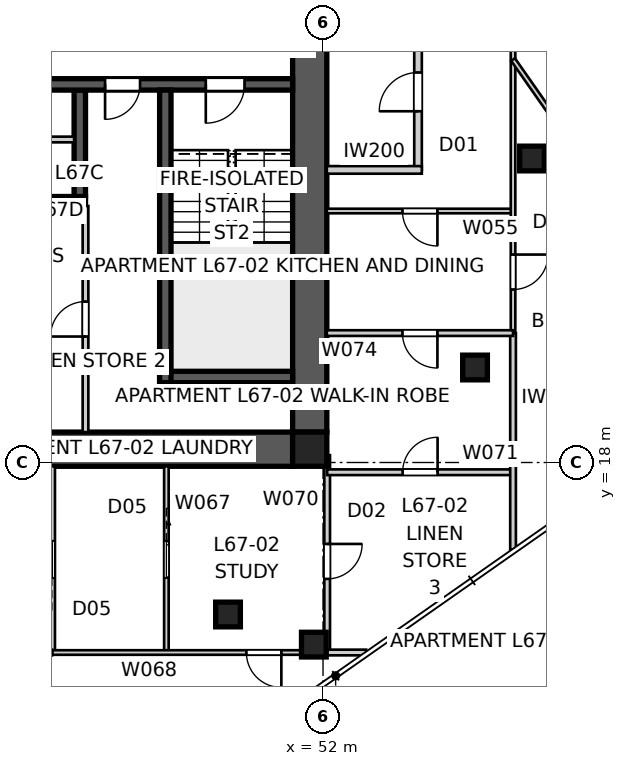
"""IFC4 building model, lengths in metres.
Left out: names, types, materials, properties, quantities, classifications, styles, units other than length and angle.
Written with IfcOpenShell. Run it as: python <this file> out.ifc"""

import sys

from ifc_helpers import new_model, si_unit, direction, frame, frame_2d, origin, origin_2d, place, context, subcontext, project, spatial, polyline, rectangle, outline, extrude, element, fill, save


model = new_model("IFC4")
c1 = context("Model", 3, precision=1e-05, world=origin(), true_north=direction((0.0, 1.0)))
c2 = subcontext(c1, "Body", "Model", "MODEL_VIEW")
j1 = project(units=[si_unit("LENGTHUNIT", "METRE"), si_unit("PLANEANGLEUNIT", "RADIAN")], contexts=[c1])
p1 = place(None, origin())
s1 = spatial("IfcSite", under=j1, at=p1, CompositionType="ELEMENT")
p2 = place(p1, origin())
s2 = spatial("IfcBuilding", under=s1, at=p2, CompositionType="ELEMENT")
p3 = place(p2, frame((0.0, 0.0, 243.8)))
s3 = spatial("IfcBuildingStorey", under=s2, at=p3, CompositionType="ELEMENT", Elevation=243.8)
p4 = place(p3, frame((51.2, 18.35, 0.0), z_axis=(0.0, 0.0, 1.0), x_axis=(-1.0, 0.0, 0.0)))
e1 = element("IfcWall", 1, at=p4, inside=s3, PredefinedType="SHEAR", context=c2, shape_type="SweptSolid", body=[
    extrude(outline(polyline([(0.0, -0.45), (22.4, -0.45), (22.4, -0.025), (22.85, -0.025), (22.85, 0.025), (22.4, 0.025), (22.4, 0.45), (0.0, 0.45), (0.0, 0.025), (-0.45, 0.025), (-0.45, -0.025), (0.0, -0.025), (0.0, -0.45)])), origin(), (0.0, 0.0, 1.0), 3.4),
])
p5 = place(p3, frame((51.65, 18.8, 0.0), z_axis=(0.0, 0.0, 1.0), x_axis=(0.0, 1.0, 0.0)))
e2 = element("IfcWall", 2, at=p5, inside=s3, PredefinedType="SHEAR", context=c2, shape_type="SweptSolid", body=[
    extrude(outline(polyline([(0.0, -0.45), (22.4, -0.45), (22.4, -0.025), (22.85, -0.025), (22.85, 0.025), (22.4, 0.025), (22.4, 0.45), (0.0, 0.45), (0.0, 0.025), (-0.45, 0.025), (-0.45, -0.025), (0.0, -0.025), (0.0, -0.45)])), origin(), (0.0, 0.0, 1.0), 3.4),
])
p6 = place(p5, frame((11.14, 0.0, 0.0)))
e3 = element("IfcOpeningElement", 3, at=p6, cuts=e2, PredefinedType="OPENING", context=c2, shape_type="SweptSolid", body=[
    extrude(rectangle(XDim=1.02, YDim=2.4, at=frame_2d((0.51, 1.2))), frame((0.0, 0.46, 0.0), z_axis=(0.0, -1.0, 0.0), x_axis=(1.0, 0.0, 0.0)), (0.0, 0.0, 1.0), 0.92),
])
p7 = place(p3, frame((51.2, 27.95, 0.0), z_axis=(0.0, 0.0, 1.0), x_axis=(-1.0, 0.0, 0.0)))
e4 = element("IfcWall", 4, at=p7, inside=s3, PredefinedType="SHEAR", context=c2, shape_type="SweptSolid", body=[
    extrude(rectangle(XDim=22.4, YDim=0.3, at=frame_2d((11.2, 0.0))), origin(), (0.0, 0.0, 1.0), 3.4),
])
p8 = place(p7, frame((19.04, 0.0, 0.0)))
e5 = element("IfcOpeningElement", 5, at=p8, cuts=e4, PredefinedType="OPENING", context=c2, shape_type="SweptSolid", body=[
    extrude(rectangle(XDim=0.92, YDim=2.1, at=frame_2d((0.46, 1.05))), frame((0.0, 0.16, 0.0), z_axis=(0.0, -1.0, 0.0), x_axis=(1.0, 0.0, 0.0)), (0.0, 0.0, 1.0), 0.32),
])
p9 = place(p7, frame((1.265, 0.0, 0.0)))
e6 = element("IfcOpeningElement", 6, at=p9, cuts=e4, PredefinedType="OPENING", context=c2, shape_type="SweptSolid", body=[
    extrude(rectangle(XDim=1.02, YDim=2.1, at=frame_2d((0.51, 1.05))), frame((0.0, 0.16, 0.0), z_axis=(0.0, -1.0, 0.0), x_axis=(1.0, 0.0, 0.0)), (0.0, 0.0, 1.0), 0.32),
])
p10 = place(p7, frame((4.015, 0.0, 0.0)))
e7 = element("IfcOpeningElement", 7, at=p10, cuts=e4, PredefinedType="OPENING", context=c2, shape_type="SweptSolid", body=[
    extrude(rectangle(XDim=0.92, YDim=2.1, at=frame_2d((0.46, 1.05))), frame((0.0, 0.16, 0.0), z_axis=(0.0, -1.0, 0.0), x_axis=(1.0, 0.0, 0.0)), (0.0, 0.0, 1.0), 0.32),
])
p11 = place(p7, frame((9.34, 0.0, 0.0)))
e8 = element("IfcOpeningElement", 8, at=p11, cuts=e4, PredefinedType="OPENING", context=c2, shape_type="SweptSolid", body=[
    extrude(rectangle(XDim=0.92, YDim=2.1, at=frame_2d((0.46, 1.05))), frame((0.0, 0.16, 0.0), z_axis=(0.0, -1.0, 0.0), x_axis=(1.0, 0.0, 0.0)), (0.0, 0.0, 1.0), 0.32),
])
p12 = place(p7, frame((7.015, 0.0, 0.0)))
e9 = element("IfcOpeningElement", 9, at=p12, cuts=e4, PredefinedType="OPENING", context=c2, shape_type="SweptSolid", body=[
    extrude(rectangle(XDim=0.92, YDim=2.1, at=frame_2d((0.46, 1.05))), frame((0.0, 0.16, 0.0), z_axis=(0.0, -1.0, 0.0), x_axis=(1.0, 0.0, 0.0)), (0.0, 0.0, 1.0), 0.32),
])
p13 = place(p7, frame((12.05, 0.0, 0.0)))
e10 = element("IfcOpeningElement", 10, at=p13, cuts=e4, PredefinedType="OPENING", context=c2, shape_type="SweptSolid", body=[
    extrude(rectangle(XDim=1.1, YDim=2.1, at=frame_2d((0.55, 1.05))), frame((0.0, 0.16, 0.0), z_axis=(0.0, -1.0, 0.0), x_axis=(1.0, 0.0, 0.0)), (0.0, 0.0, 1.0), 0.32),
])
p14 = place(p7, frame((14.85, 0.0, 0.0)))
e11 = element("IfcOpeningElement", 11, at=p14, cuts=e4, PredefinedType="OPENING", context=c2, shape_type="SweptSolid", body=[
    extrude(rectangle(XDim=1.1, YDim=2.1, at=frame_2d((0.55, 1.05))), frame((0.0, 0.16, 0.0), z_axis=(0.0, -1.0, 0.0), x_axis=(1.0, 0.0, 0.0)), (0.0, 0.0, 1.0), 0.32),
])
p15 = place(p3, frame((45.75, 24.85, 0.0), z_axis=(0.0, 0.0, 1.0), x_axis=(-1.0, 0.0, 0.0)))
e12 = element("IfcWall", 12, at=p15, inside=s3, PredefinedType="SHEAR", context=c2, shape_type="SweptSolid", body=[
    extrude(rectangle(XDim=11.5, YDim=0.3, at=frame_2d((5.75, 0.0))), origin(), (0.0, 0.0, 1.0), 3.4),
])
p16 = place(p3, frame((45.6, 27.8, 0.0), z_axis=(0.0, 0.0, 1.0), x_axis=(0.0, -1.0, 0.0)))
e13 = element("IfcWall", 13, at=p16, inside=s3, PredefinedType="SHEAR", context=c2, shape_type="SweptSolid", body=[
    extrude(rectangle(XDim=2.8, YDim=0.3, at=frame_2d((1.4, 0.0))), origin(), (0.0, 0.0, 1.0), 3.4),
])
p17 = place(p3, frame((47.85, 27.8, 0.0), z_axis=(0.0, 0.0, 1.0), x_axis=(0.0, -1.0, 0.0)))
e14 = element("IfcWall", 14, at=p17, inside=s3, PredefinedType="SHEAR", context=c2, shape_type="SweptSolid", body=[
    extrude(rectangle(XDim=7.7, YDim=0.3, at=frame_2d((3.85, 0.0))), origin(), (0.0, 0.0, 1.0), 3.4),
])
p18 = place(p3, frame((51.2, 20.25, 0.0), z_axis=(0.0, 0.0, 1.0), x_axis=(-1.0, 0.0, 0.0)))
e15 = element("IfcWall", 15, at=p18, inside=s3, PredefinedType="SHEAR", context=c2, shape_type="SweptSolid", body=[
    extrude(rectangle(XDim=3.5, YDim=0.3, at=frame_2d((1.75, 0.0))), origin(), (0.0, 0.0, 1.0), 3.4),
])
p19 = place(p3, frame((51.65, 18.35, 0.0), z_axis=(0.0, 0.0, 1.0), x_axis=(1.0, 0.0, 0.0)))
e16 = element("IfcColumn", 16, at=p19, inside=s3, PredefinedType="COLUMN", context=c2, shape_type="SweptSolid", body=[
    extrude(rectangle(XDim=0.9, YDim=0.9, at=origin_2d()), origin(), (0.0, 0.0, 1.0), 3.4),
])
for number, where, z_axis, x_axis in (
    (17, (51.758, 13.207, 0.0), (0.0, 0.0, 1.0), (1.0, 0.0, 0.0)),
    (18, (57.5, 26.0, 0.0), (0.0, 0.0, 1.0), (1.0, 0.0, 0.0)),
    (19, (49.5, 14.0, 0.0), (0.0, 0.0, 1.0), (1.0, 0.0, 0.0)),
    (20, (56.0, 20.5, 0.0), (0.0, 0.0, 1.0), (1.0, 0.0, 0.0)),
):
    element("IfcColumn", number, at=place(p3, frame(where, z_axis=z_axis, x_axis=x_axis)), inside=s3, PredefinedType="COLUMN", context=c2, shape_type="SweptSolid", body=[
        extrude(rectangle(XDim=0.65, YDim=0.65, at=origin_2d()), origin(), (0.0, 0.0, 1.0), 3.4),
    ])
p20 = place(p3, frame((54.5, 25.7, 0.0), z_axis=(0.0, 0.0, 1.0), x_axis=(0.0, 1.0, 0.0)))
e21 = element("IfcWall", 21, at=p20, inside=s3, PredefinedType="PARTITIONING", context=c2, shape_type="SweptSolid", body=[
    extrude(rectangle(XDim=8.6, YDim=0.2, at=frame_2d((4.3, 0.0))), origin(), (0.0, 0.0, 1.0), 3.25),
])
p21 = place(p20, frame((5.438, 0.0, 0.0)))
e22 = element("IfcOpeningElement", 22, at=p21, cuts=e21, PredefinedType="OPENING", context=c2, shape_type="SweptSolid", body=[
    extrude(rectangle(XDim=1.02, YDim=2.34, at=frame_2d((0.51, 1.17))), frame((0.0, 0.11, 0.0), z_axis=(0.0, -1.0, 0.0), x_axis=(1.0, 0.0, 0.0)), (0.0, 0.0, 1.0), 0.22),
])
p22 = place(p20, frame((1.543, 0.0, 0.0)))
e23 = element("IfcOpeningElement", 23, at=p22, cuts=e21, PredefinedType="OPENING", context=c2, shape_type="SweptSolid", body=[
    extrude(rectangle(XDim=1.02, YDim=2.34, at=frame_2d((0.51, 1.17))), frame((0.0, 0.11, 0.0), z_axis=(0.0, -1.0, 0.0), x_axis=(1.0, 0.0, 0.0)), (0.0, 0.0, 1.0), 0.22),
])
p23 = place(p3, frame((52.1, 25.7, 0.0), z_axis=(0.0, 0.0, 1.0), x_axis=(1.0, 0.0, 0.0)))
e24 = element("IfcWall", 24, at=p23, inside=s3, PredefinedType="PARTITIONING", context=c2, shape_type="SweptSolid", body=[
    extrude(rectangle(XDim=2.5, YDim=0.2, at=frame_2d((1.25, 0.0))), origin(), (0.0, 0.0, 1.0), 3.25),
])
p24 = place(p3, frame((45.75, 18.8, 0.0), z_axis=(0.0, 0.0, 1.0), x_axis=(0.0, 1.0, 0.0)))
e25 = element("IfcWall", 25, at=p24, inside=s3, PredefinedType="SOLIDWALL", context=c2, shape_type="SweptSolid", body=[
    extrude(rectangle(XDim=5.95, YDim=0.15, at=frame_2d((2.975, 0.0))), origin(), (0.0, 0.0, 1.0), 3.25),
])
p25 = place(p24, frame((2.515, 0.0, 0.0)))
e26 = element("IfcOpeningElement", 26, at=p25, cuts=e25, PredefinedType="OPENING", context=c2, shape_type="SweptSolid", body=[
    extrude(rectangle(XDim=0.92, YDim=2.1, at=frame_2d((0.46, 1.05))), frame((0.0, 0.085, 0.0), z_axis=(0.0, -1.0, 0.0), x_axis=(1.0, 0.0, 0.0)), (0.0, 0.0, 1.0), 0.17),
])
p26 = place(p3, frame((57.0, 24.618, 0.0), z_axis=(0.0, 0.0, 1.0), x_axis=(-1.0, 0.0, 0.0)))
e27 = element("IfcWall", 27, at=p26, inside=s3, PredefinedType="PARTITIONING", context=c2, shape_type="SweptSolid", body=[
    extrude(rectangle(XDim=4.9, YDim=0.12, at=frame_2d((2.45, 0.0))), origin(), (0.0, 0.0, 1.0), 3.25),
])
p27 = place(p26, frame((1.99, 0.0, 0.0)))
e28 = element("IfcOpeningElement", 28, at=p27, cuts=e27, PredefinedType="OPENING", context=c2, shape_type="SweptSolid", body=[
    extrude(rectangle(XDim=0.92, YDim=2.34, at=frame_2d((0.46, 1.17))), frame((0.0, 0.07, 0.0), z_axis=(0.0, -1.0, 0.0), x_axis=(1.0, 0.0, 0.0)), (0.0, 0.0, 1.0), 0.14),
])
p28 = place(p3, frame((57.0, 41.904, 0.0), z_axis=(0.0, 0.0, 1.0), x_axis=(0.0, -1.0, 0.0)))
e29 = element("IfcWall", 29, at=p28, inside=s3, PredefinedType="PARTITIONING", context=c2, shape_type="SweptSolid", body=[
    extrude(rectangle(XDim=20.498, YDim=0.12, at=frame_2d((10.249, 0.0))), origin(), (0.0, 0.0, 1.0), 2.55),
])
p29 = place(p28, frame((8.449, 0.0, 0.0)))
e30 = element("IfcOpeningElement", 30, at=p29, cuts=e29, PredefinedType="OPENING", context=c2, shape_type="SweptSolid", body=[
    extrude(rectangle(XDim=0.92, YDim=2.34, at=frame_2d((0.46, 1.17))), frame((0.0, 0.07, 0.0), z_axis=(0.0, -1.0, 0.0), x_axis=(1.0, 0.0, 0.0)), (0.0, 0.0, 1.0), 0.14),
])
p30 = place(p28, frame((11.574, 0.0, 0.0)))
e31 = element("IfcOpeningElement", 31, at=p30, cuts=e29, PredefinedType="OPENING", context=c2, shape_type="SweptSolid", body=[
    extrude(rectangle(XDim=0.92, YDim=2.34, at=frame_2d((0.46, 1.17))), frame((0.0, 0.07, 0.0), z_axis=(0.0, -1.0, 0.0), x_axis=(1.0, 0.0, 0.0)), (0.0, 0.0, 1.0), 0.14),
])
p31 = place(p28, frame((18.432, 0.0, 0.0)))
e32 = element("IfcOpeningElement", 32, at=p31, cuts=e29, PredefinedType="OPENING", context=c2, shape_type="SweptSolid", body=[
    extrude(rectangle(XDim=0.92, YDim=2.34, at=frame_2d((0.46, 1.17))), frame((0.0, 0.07, 0.0), z_axis=(0.0, -1.0, 0.0), x_axis=(1.0, 0.0, 0.0)), (0.0, 0.0, 1.0), 0.14),
])
p32 = place(p3, frame((44.871, 13.0, 0.0), z_axis=(0.0, 0.0, 1.0), x_axis=(0.0, 1.0, 0.0)))
e33 = element("IfcWall", 33, at=p32, inside=s3, PredefinedType="SOLIDWALL", context=c2, shape_type="SweptSolid", body=[
    extrude(rectangle(XDim=4.9, YDim=0.15, at=frame_2d((2.45, 0.0))), origin(), (0.0, 0.0, 1.0), 3.25),
])
p33 = place(p32, frame((1.97, 0.0, 0.0)))
e34 = element("IfcOpeningElement", 34, at=p33, cuts=e33, PredefinedType="OPENING", context=c2, shape_type="SweptSolid", body=[
    extrude(rectangle(XDim=0.96, YDim=2.1, at=frame_2d((0.48, 1.05))), frame((0.0, 0.085, 0.0), z_axis=(0.0, -1.0, 0.0), x_axis=(1.0, 0.0, 0.0)), (0.0, 0.0, 1.0), 0.17),
])
p34 = place(p3, frame((47.878, 17.9, 0.0), z_axis=(0.0, 0.0, 1.0), x_axis=(0.0, -1.0, 0.0)))
e35 = element("IfcWall", 35, at=p34, inside=s3, PredefinedType="PARTITIONING", context=c2, shape_type="SweptSolid", body=[
    extrude(rectangle(XDim=4.9, YDim=0.12, at=frame_2d((2.45, 0.0))), origin(), (0.0, 0.0, 1.0), 3.25),
])
p35 = place(p34, frame((1.97, 0.0, 0.0)))
e36 = element("IfcOpeningElement", 36, at=p35, cuts=e35, PredefinedType="OPENING", context=c2, shape_type="SweptSolid", body=[
    extrude(rectangle(XDim=0.96, YDim=2.1, at=frame_2d((0.48, 1.05))), frame((0.0, 0.07, 0.0), z_axis=(0.0, -1.0, 0.0), x_axis=(1.0, 0.0, 0.0)), (0.0, 0.0, 1.0), 0.14),
])
p36 = place(p3, frame((52.109, 13.0, 0.0), z_axis=(0.0, 0.0, 1.0), x_axis=(-1.0, 0.0, 0.0)))
e37 = element("IfcWall", 37, at=p36, inside=s3, PredefinedType="PARTITIONING", context=c2, shape_type="SweptSolid", body=[
    extrude(rectangle(XDim=7.238, YDim=0.12, at=frame_2d((3.619, 0.0))), origin(), (0.0, 0.0, 1.0), 2.55),
])
p37 = place(p36, frame((1.205, 0.0, 0.0)))
e38 = element("IfcOpeningElement", 38, at=p37, cuts=e37, PredefinedType="OPENING", context=c2, shape_type="SweptSolid", body=[
    extrude(rectangle(XDim=0.92, YDim=2.34, at=frame_2d((0.46, 1.17))), frame((0.0, 0.07, 0.0), z_axis=(0.0, -1.0, 0.0), x_axis=(1.0, 0.0, 0.0)), (0.0, 0.0, 1.0), 0.14),
])
p38 = place(p3, frame((44.871, 13.0, 0.0), z_axis=(0.0, 0.0, 1.0), x_axis=(-1.0, 0.0, 0.0)))
e39 = element("IfcWall", 39, at=p38, inside=s3, PredefinedType="SOLIDWALL", context=c2, shape_type="SweptSolid", body=[
    extrude(rectangle(XDim=3.007, YDim=0.15, at=frame_2d((1.503, 0.0))), origin(), (0.0, 0.0, 1.0), 3.25),
])
p39 = place(p3, frame((52.109, 18.194, 0.0), z_axis=(0.0, 0.0, 1.0), x_axis=(0.0, -1.0, 0.0)))
e40 = element("IfcWall", 40, at=p39, inside=s3, PredefinedType="SOLIDWALL", context=c2, shape_type="SweptSolid", body=[
    extrude(rectangle(XDim=5.194, YDim=0.15, at=frame_2d((2.597, 0.0))), origin(), (0.0, 0.0, 1.0), 3.25),
])
p40 = place(p39, frame((2.337, 0.0, 0.0)))
e41 = element("IfcOpeningElement", 41, at=p40, cuts=e40, PredefinedType="OPENING", context=c2, shape_type="SweptSolid", body=[
    extrude(rectangle(XDim=0.92, YDim=2.34, at=frame_2d((0.46, 1.17))), frame((0.0, 0.085, 0.0), z_axis=(0.0, -1.0, 0.0), x_axis=(1.0, 0.0, 0.0)), (0.0, 0.0, 1.0), 0.17),
])
p41 = place(p3, frame((52.109, 17.743, 0.0), z_axis=(0.0, 0.0, 1.0), x_axis=(1.0, 0.0, 0.0)))
e42 = element("IfcWall", 42, at=p41, inside=s3, PredefinedType="SOLIDWALL", context=c2, shape_type="SweptSolid", body=[
    extrude(rectangle(XDim=4.891, YDim=0.15, at=frame_2d((2.446, 0.0))), origin(), (0.0, 0.0, 1.0), 3.25),
])
p42 = place(p41, frame((1.986, 0.0, 0.0)))
e43 = element("IfcOpeningElement", 43, at=p42, cuts=e42, PredefinedType="OPENING", context=c2, shape_type="SweptSolid", body=[
    extrude(rectangle(XDim=0.92, YDim=2.34, at=frame_2d((0.46, 1.17))), frame((0.0, 0.085, 0.0), z_axis=(0.0, -1.0, 0.0), x_axis=(1.0, 0.0, 0.0)), (0.0, 0.0, 1.0), 0.17),
])
p43 = place(p3, frame((57.0, 21.406, 0.0), z_axis=(0.0, 0.0, 1.0), x_axis=(0.0, -1.0, 0.0)))
e44 = element("IfcWall", 44, at=p43, inside=s3, PredefinedType="SOLIDWALL", context=c2, shape_type="SweptSolid", body=[
    extrude(rectangle(XDim=5.7, YDim=0.15, at=frame_2d((2.85, 0.0))), origin(), (0.0, 0.0, 1.0), 3.25),
])
p44 = place(p3, frame((53.136, 13.0, 0.0), z_axis=(0.0, 0.0, 1.0), x_axis=(-1.0, 0.0, 0.0)))
e45 = element("IfcWall", 45, at=p44, inside=s3, PredefinedType="SOLIDWALL", context=c2, shape_type="SweptSolid", body=[
    extrude(rectangle(XDim=1.027, YDim=0.15, at=frame_2d((0.513, 0.0))), origin(), (0.0, 0.0, 1.0), 3.25),
])
p45 = place(p3, frame((57.0, 21.406, 0.0), z_axis=(0.0, 0.0, 1.0), x_axis=(-1.0, 0.0, 0.0)))
e46 = element("IfcWall", 46, at=p45, inside=s3, PredefinedType="SOLIDWALL", context=c2, shape_type="SweptSolid", body=[
    extrude(rectangle(XDim=4.9, YDim=0.15, at=frame_2d((2.45, 0.0))), origin(), (0.0, 0.0, 1.0), 3.25),
])
p46 = place(p45, frame((1.99, 0.0, 0.0)))
e47 = element("IfcOpeningElement", 47, at=p46, cuts=e46, PredefinedType="OPENING", context=c2, shape_type="SweptSolid", body=[
    extrude(rectangle(XDim=0.92, YDim=2.34, at=frame_2d((0.46, 1.17))), frame((0.0, 0.085, 0.0), z_axis=(0.0, -1.0, 0.0), x_axis=(1.0, 0.0, 0.0)), (0.0, 0.0, 1.0), 0.17),
])
p47 = place(p3, frame((41.222, 13.0, 0.0), z_axis=(0.0, 0.0, 1.0), x_axis=(0.57357503053, -0.819153028653, 0.0)))
e48 = element("IfcWall", 48, at=p47, inside=s3, PredefinedType="PARTITIONING", context=c2, shape_type="SweptSolid", body=[
    extrude(rectangle(XDim=6.834, YDim=0.12, at=frame_2d((3.417, 0.0))), origin(), (0.0, 0.0, 1.0), 3.25),
])
p48 = place(p47, frame((3.386, 0.0, 0.0)))
e49 = element("IfcOpeningElement", 49, at=p48, cuts=e48, PredefinedType="OPENING", context=c2, shape_type="SweptSolid", body=[
    extrude(rectangle(XDim=0.92, YDim=2.34, at=frame_2d((0.46, 1.17))), frame((0.0, 0.07, 0.0), z_axis=(0.0, -1.0, 0.0), x_axis=(1.0, 0.0, 0.0)), (0.0, 0.0, 1.0), 0.14),
])
p49 = place(p3, frame((57.0, 28.604, 0.0), z_axis=(0.0, 0.0, 1.0), x_axis=(0.573575545802, -0.819152667857, 0.0)))
e50 = element("IfcWall", 50, at=p49, inside=s3, PredefinedType="PARTITIONING", context=c2, shape_type="SweptSolid", body=[
    extrude(rectangle(XDim=10.566, YDim=0.12, at=frame_2d((5.283, 0.0))), origin(), (0.0, 0.0, 1.0), 3.25),
])
p50 = place(p49, frame((8.121, 0.0, 0.0)))
e51 = element("IfcOpeningElement", 51, at=p50, cuts=e50, PredefinedType="OPENING", context=c2, shape_type="SweptSolid", body=[
    extrude(rectangle(XDim=0.92, YDim=2.34, at=frame_2d((0.46, 1.17))), frame((0.0, 0.07, 0.0), z_axis=(0.0, -1.0, 0.0), x_axis=(1.0, 0.0, 0.0)), (0.0, 0.0, 1.0), 0.14),
])
p51 = place(p3, frame((40.1, 26.5, 0.0), z_axis=(0.0, 0.0, 1.0), x_axis=(1.0, 0.0, 0.0)))
e52 = element("IfcWall", 52, at=p51, inside=s3, PredefinedType="SOLIDWALL", context=c2, shape_type="SweptSolid", body=[
    extrude(rectangle(XDim=5.35, YDim=0.15, at=frame_2d((2.675, 0.0))), origin(), (0.0, 0.0, 1.0), 3.25),
])
p52 = place(p51, frame((2.215, 0.0, 0.0)))
e53 = element("IfcOpeningElement", 53, at=p52, cuts=e52, PredefinedType="OPENING", context=c2, shape_type="SweptSolid", body=[
    extrude(rectangle(XDim=0.92, YDim=2.1, at=frame_2d((0.46, 1.05))), frame((0.0, 0.085, 0.0), z_axis=(0.0, -1.0, 0.0), x_axis=(1.0, 0.0, 0.0)), (0.0, 0.0, 1.0), 0.17),
])
p53 = place(p9, origin())
e54 = element("IfcDoor", 54, at=p53, inside=s3, OperationType="SINGLE_SWING_RIGHT", PredefinedType="DOOR", context=c2, shape_type="SweptSolid", body=[
    extrude(rectangle(XDim=1.02, YDim=2.1, at=frame_2d((0.51, 1.05))), frame((0.0, 0.025, 0.0), z_axis=(0.0, -1.0, 0.0), x_axis=(1.0, 0.0, 0.0)), (0.0, 0.0, 1.0), 0.05),
])
fill(e6, e54)
p54 = place(p10, origin())
e55 = element("IfcDoor", 55, at=p54, inside=s3, OperationType="SINGLE_SWING_RIGHT", PredefinedType="DOOR", context=c2, shape_type="SweptSolid", body=[
    extrude(rectangle(XDim=0.92, YDim=2.1, at=frame_2d((0.46, 1.05))), frame((0.0, 0.025, 0.0), z_axis=(0.0, -1.0, 0.0), x_axis=(1.0, 0.0, 0.0)), (0.0, 0.0, 1.0), 0.05),
])
fill(e7, e55)
p55 = place(p22, origin())
e56 = element("IfcDoor", 56, at=p55, inside=s3, OperationType="SINGLE_SWING_LEFT", PredefinedType="DOOR", context=c2, shape_type="SweptSolid", body=[
    extrude(rectangle(XDim=1.02, YDim=2.34, at=frame_2d((0.51, 1.17))), frame((0.0, 0.025, 0.0), z_axis=(0.0, -1.0, 0.0), x_axis=(1.0, 0.0, 0.0)), (0.0, 0.0, 1.0), 0.05),
])
fill(e23, e56)
p56 = place(p25, origin())
e57 = element("IfcDoor", 57, at=p56, inside=s3, OperationType="SINGLE_SWING_LEFT", PredefinedType="DOOR", context=c2, shape_type="SweptSolid", body=[
    extrude(rectangle(XDim=0.92, YDim=2.1, at=frame_2d((0.46, 1.05))), frame((0.0, 0.025, 0.0), z_axis=(0.0, -1.0, 0.0), x_axis=(1.0, 0.0, 0.0)), (0.0, 0.0, 1.0), 0.05),
])
fill(e26, e57)
p57 = place(p27, origin())
e58 = element("IfcDoor", 58, at=p57, inside=s3, OperationType="SINGLE_SWING_LEFT", PredefinedType="DOOR", context=c2, shape_type="SweptSolid", body=[
    extrude(rectangle(XDim=0.92, YDim=2.34, at=frame_2d((0.46, 1.17))), frame((0.0, 0.025, 0.0), z_axis=(0.0, -1.0, 0.0), x_axis=(1.0, 0.0, 0.0)), (0.0, 0.0, 1.0), 0.05),
])
fill(e28, e58)
p58 = place(p46, origin())
e59 = element("IfcDoor", 59, at=p58, inside=s3, OperationType="SINGLE_SWING_LEFT", PredefinedType="DOOR", context=c2, shape_type="SweptSolid", body=[
    extrude(rectangle(XDim=0.92, YDim=2.34, at=frame_2d((0.46, 1.17))), frame((0.0, 0.025, 0.0), z_axis=(0.0, -1.0, 0.0), x_axis=(1.0, 0.0, 0.0)), (0.0, 0.0, 1.0), 0.05),
])
fill(e47, e59)
p59 = place(p31, origin())
e60 = element("IfcDoor", 60, at=p59, inside=s3, OperationType="SINGLE_SWING_LEFT", PredefinedType="DOOR", context=c2, shape_type="SweptSolid", body=[
    extrude(rectangle(XDim=0.92, YDim=2.34, at=frame_2d((0.46, 1.17))), frame((0.0, 0.025, 0.0), z_axis=(0.0, -1.0, 0.0), x_axis=(1.0, 0.0, 0.0)), (0.0, 0.0, 1.0), 0.05),
])
fill(e32, e60)
p60 = place(p42, origin())
e61 = element("IfcDoor", 61, at=p60, inside=s3, OperationType="SINGLE_SWING_RIGHT", PredefinedType="DOOR", context=c2, shape_type="SweptSolid", body=[
    extrude(rectangle(XDim=0.92, YDim=2.34, at=frame_2d((0.46, 1.17))), frame((0.0, 0.025, 0.0), z_axis=(0.0, -1.0, 0.0), x_axis=(1.0, 0.0, 0.0)), (0.0, 0.0, 1.0), 0.05),
])
fill(e43, e61)
p61 = place(p40, origin())
e62 = element("IfcDoor", 62, at=p61, inside=s3, OperationType="SINGLE_SWING_LEFT", PredefinedType="DOOR", context=c2, shape_type="SweptSolid", body=[
    extrude(rectangle(XDim=0.92, YDim=2.34, at=frame_2d((0.46, 1.17))), frame((0.0, 0.025, 0.0), z_axis=(0.0, -1.0, 0.0), x_axis=(1.0, 0.0, 0.0)), (0.0, 0.0, 1.0), 0.05),
])
fill(e41, e62)
p62 = place(p35, origin())
e63 = element("IfcDoor", 63, at=p62, inside=s3, OperationType="SLIDING_TO_LEFT", PredefinedType="DOOR", context=c2, shape_type="SweptSolid", body=[
    extrude(rectangle(XDim=0.96, YDim=2.1, at=frame_2d((0.48, 1.05))), frame((0.0, 0.025, 0.0), z_axis=(0.0, -1.0, 0.0), x_axis=(1.0, 0.0, 0.0)), (0.0, 0.0, 1.0), 0.05),
])
fill(e36, e63)
p63 = place(p37, origin())
e64 = element("IfcDoor", 64, at=p63, inside=s3, OperationType="SINGLE_SWING_LEFT", PredefinedType="DOOR", context=c2, shape_type="SweptSolid", body=[
    extrude(rectangle(XDim=0.92, YDim=2.34, at=frame_2d((0.46, 1.17))), frame((0.0, 0.025, 0.0), z_axis=(0.0, -1.0, 0.0), x_axis=(1.0, 0.0, 0.0)), (0.0, 0.0, 1.0), 0.05),
])
fill(e38, e64)
p64 = place(p33, origin())
e65 = element("IfcDoor", 65, at=p64, inside=s3, OperationType="SLIDING_TO_LEFT", PredefinedType="DOOR", context=c2, shape_type="SweptSolid", body=[
    extrude(rectangle(XDim=0.96, YDim=2.1, at=frame_2d((0.48, 1.05))), frame((0.0, 0.025, 0.0), z_axis=(0.0, -1.0, 0.0), x_axis=(1.0, 0.0, 0.0)), (0.0, 0.0, 1.0), 0.05),
])
fill(e34, e65)
save(model, sys.argv[1])
